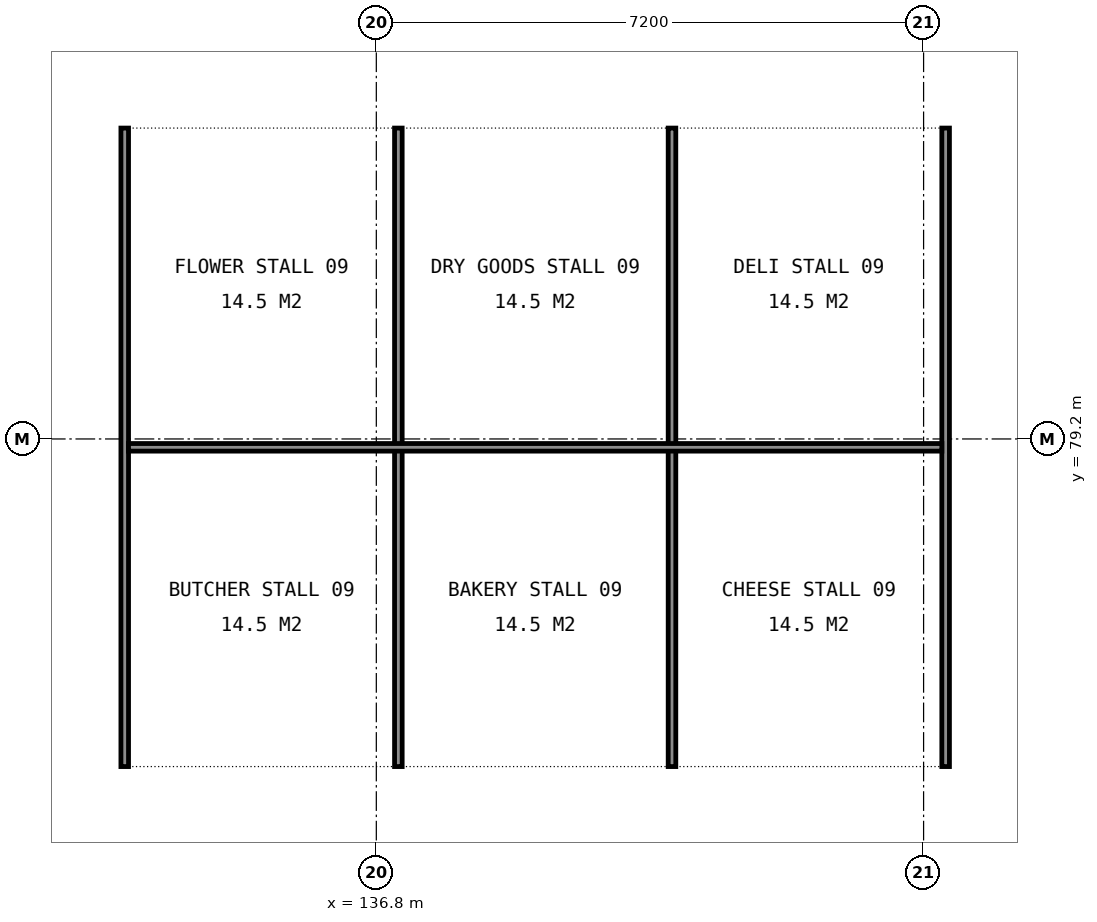
"""IFC4 building model, lengths in metres.
Left out: names, types, materials, properties, quantities, classifications, styles, units other than length and angle.
Written with IfcOpenShell. Run it as: python <this file> out.ifc"""

import sys

from ifc_helpers import new_model, si_unit, direction, frame, frame_2d, origin, place, context, subcontext, project, spatial, rectangle, extrude, element, save


model = new_model("IFC4")
c1 = context("Model", 3, precision=1e-05, world=origin(), true_north=direction((0.0, 1.0)))
c2 = subcontext(c1, "Body", "Model", "MODEL_VIEW")
j1 = project(units=[si_unit("LENGTHUNIT", "METRE"), si_unit("PLANEANGLEUNIT", "RADIAN")], contexts=[c1])
p1 = place(None, origin())
s1 = spatial("IfcSite", under=j1, at=p1, CompositionType="ELEMENT")
p2 = place(p1, origin())
s2 = spatial("IfcBuilding", under=s1, at=p2, CompositionType="ELEMENT")
p3 = place(p2, origin())
s3 = spatial("IfcBuildingStorey", under=s2, at=p3, CompositionType="ELEMENT", Elevation=0.0)
for number, where, z_axis, x_axis in (
    (1, (133.49, 74.89, 0.0), (0.0, 0.0, 1.0), (0.0, 1.0, 0.0)),
    (2, (137.09, 74.89, 0.0), (0.0, 0.0, 1.0), (0.0, 1.0, 0.0)),
    (3, (140.69, 74.89, 0.0), (0.0, 0.0, 1.0), (0.0, 1.0, 0.0)),
    (4, (144.29, 74.89, 0.0), (0.0, 0.0, 1.0), (0.0, 1.0, 0.0)),
):
    element("IfcWall", number, at=place(p3, frame(where, z_axis=z_axis, x_axis=x_axis)), inside=s3, PredefinedType="PARTITIONING", context=c2, shape_type="SweptSolid", body=[
        extrude(rectangle(XDim=8.4, YDim=0.1, at=frame_2d((4.2, 0.0))), origin(), (0.0, 0.0, 1.0), 1.2),
    ])
p4 = place(p3, frame((133.54, 79.09, 0.0), z_axis=(0.0, 0.0, 1.0), x_axis=(1.0, 0.0, 0.0)))
e5 = element("IfcWall", 5, at=p4, inside=s3, PredefinedType="PARTITIONING", context=c2, shape_type="SweptSolid", body=[
    extrude(rectangle(XDim=10.7, YDim=0.1, at=frame_2d((5.35, 0.0))), origin(), (0.0, 0.0, 1.0), 1.2),
])
save(model, sys.argv[1])
